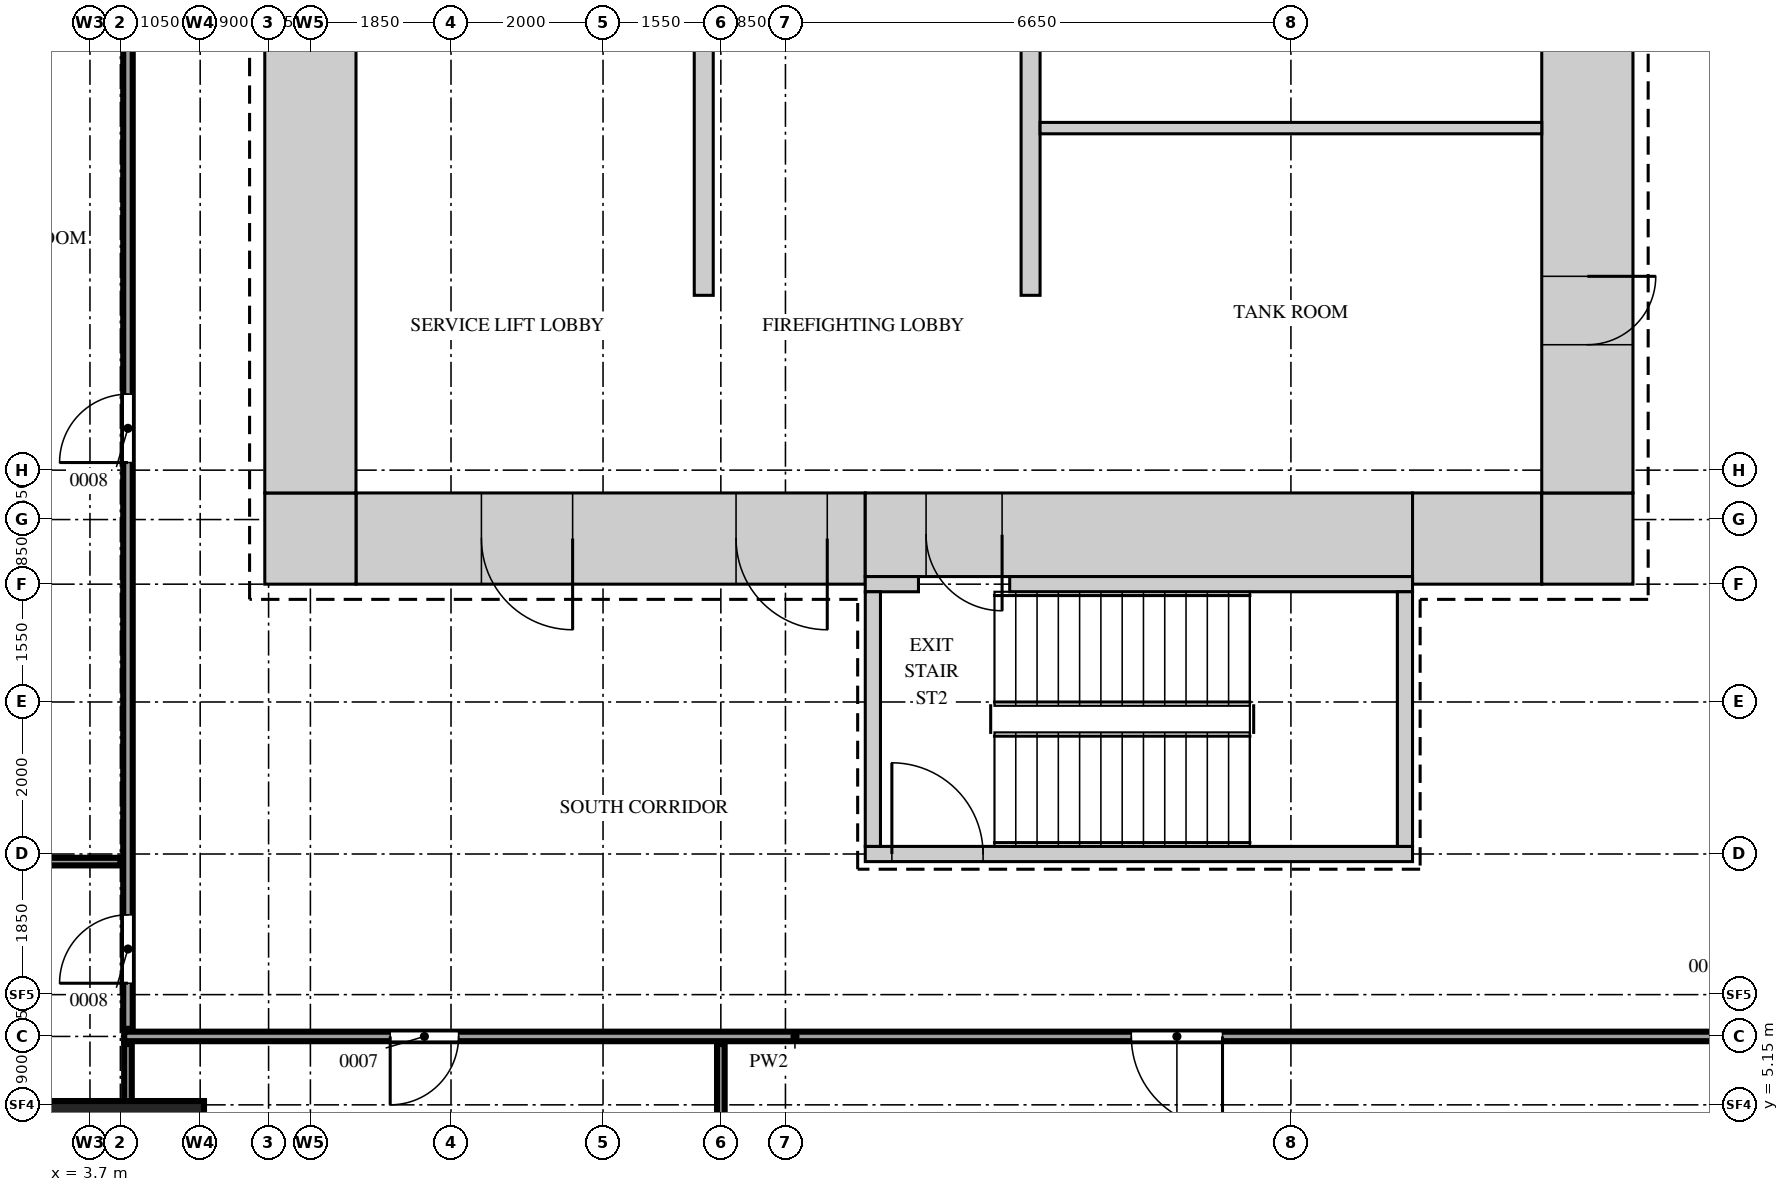
"""IFC4 building model, lengths in metres.
Left out: names, types, materials, properties, quantities, classifications, styles, units other than length and angle.
Written with IfcOpenShell. Run it as: python <this file> out.ifc"""

import sys

from ifc_helpers import new_model, si_unit, direction, frame, frame_2d, origin, origin_2d, place, context, subcontext, project, spatial, rectangle, extrude, source, transform, mapped, element, fill, save


model = new_model("IFC4")
c1 = context("Model", 3, precision=1e-05, world=origin(), true_north=direction((0.0, 1.0)))
c2 = subcontext(c1, "Body", "Model", "MODEL_VIEW")
j1 = project(units=[si_unit("LENGTHUNIT", "METRE"), si_unit("PLANEANGLEUNIT", "RADIAN")], contexts=[c1])
p1 = place(None, origin())
s1 = spatial("IfcSite", under=j1, at=p1, CompositionType="ELEMENT")
p2 = place(p1, origin())
s2 = spatial("IfcBuilding", under=s1, at=p2, CompositionType="ELEMENT")
p3 = place(p2, frame((0.0, 0.0, 37.5)))
s3 = spatial("IfcBuildingStorey", under=s2, at=p3, CompositionType="ELEMENT", Elevation=37.5)
m1 = source(origin(), c2, "Body", "SweptSolid", [
    extrude(rectangle(XDim=6.7, YDim=1.2, at=frame_2d((3.35, 0.0))), origin(), (0.0, 0.0, 1.0), 4.2),
])
p4 = place(p3, frame((7.2, 12.6, 0.0), z_axis=(0.0, 0.0, 1.0), x_axis=(1.0, 0.0, 0.0)))
e1 = element("IfcWall", 1, at=p4, inside=s3, PredefinedType="SHEAR", context=c2, shape_type="MappedRepresentation", body=[
    mapped(m1, transform((0.0, 0.0, 0.0))),
])
m2 = source(origin(), c2, "Body", "SweptSolid", [
    extrude(rectangle(XDim=1.2, YDim=2.1, at=frame_2d((0.6, 1.05))), frame((0.0, 0.61, 0.0), z_axis=(0.0, -1.0, 0.0), x_axis=(1.0, 0.0, 0.0)), (0.0, 0.0, 1.0), 1.22),
])
p5 = place(p4, frame((5.0, 0.0, 0.0)))
e2 = element("IfcOpeningElement", 2, at=p5, cuts=e1, PredefinedType="OPENING", context=c2, shape_type="MappedRepresentation", body=[
    mapped(m2, transform((0.0, 0.0, 0.0))),
])
p6 = place(p4, frame((1.65, 0.0, 0.0)))
e3 = element("IfcOpeningElement", 3, at=p6, cuts=e1, PredefinedType="OPENING", context=c2, shape_type="MappedRepresentation", body=[
    mapped(m2, transform((0.0, 0.0, 0.0))),
])
m3 = source(origin(), c2, "Body", "SweptSolid", [
    extrude(rectangle(XDim=7.2, YDim=1.1, at=frame_2d((3.6, 0.0))), origin(), (0.0, 0.0, 1.0), 4.2),
])
p7 = place(p3, frame((13.9, 12.65, 0.0), z_axis=(0.0, 0.0, 1.0), x_axis=(1.0, 0.0, 0.0)))
e4 = element("IfcWall", 4, at=p7, inside=s3, PredefinedType="SHEAR", context=c2, shape_type="MappedRepresentation", body=[
    mapped(m3, transform((0.0, 0.0, 0.0))),
])
m4 = source(origin(), c2, "Body", "SweptSolid", [
    extrude(rectangle(XDim=1.0, YDim=2.1, at=frame_2d((0.5, 1.05))), frame((0.0, 0.56, 0.0), z_axis=(0.0, -1.0, 0.0), x_axis=(1.0, 0.0, 0.0)), (0.0, 0.0, 1.0), 1.12),
])
p8 = place(p7, frame((0.8, 0.0, 0.0)))
e5 = element("IfcOpeningElement", 5, at=p8, cuts=e4, PredefinedType="OPENING", context=c2, shape_type="MappedRepresentation", body=[
    mapped(m4, transform((0.0, 0.0, 0.0))),
])
m5 = source(origin(), c2, "Body", "SweptSolid", [
    extrude(rectangle(XDim=1.7, YDim=1.2, at=frame_2d((0.85, 0.0))), origin(), (0.0, 0.0, 1.0), 4.2),
])
p9 = place(p3, frame((21.1, 12.6, 0.0), z_axis=(0.0, 0.0, 1.0), x_axis=(1.0, 0.0, 0.0)))
e6 = element("IfcWall", 6, at=p9, inside=s3, PredefinedType="SHEAR", context=c2, shape_type="MappedRepresentation", body=[
    mapped(m5, transform((0.0, 0.0, 0.0))),
])
m6 = source(origin(), c2, "Body", "SweptSolid", [
    extrude(rectangle(XDim=1.2, YDim=1.2, at=frame_2d((0.6, 0.0))), origin(), (0.0, 0.0, 1.0), 4.2),
])
for number, where, z_axis, x_axis in (
    (7, (22.8, 12.6, 0.0), (0.0, 0.0, 1.0), (1.0, 0.0, 0.0)),
    (8, (6.0, 12.6, 0.0), (0.0, 0.0, 1.0), (1.0, 0.0, 0.0)),
):
    element("IfcWall", number, at=place(p3, frame(where, z_axis=z_axis, x_axis=x_axis)), inside=s3, PredefinedType="SHEAR", context=c2, shape_type="MappedRepresentation", body=[
        mapped(m6, transform((0.0, 0.0, 0.0))),
    ])
m7 = source(origin(), c2, "Body", "SweptSolid", [
    extrude(rectangle(XDim=27.6, YDim=1.2, at=frame_2d((13.8, 0.0))), origin(), (0.0, 0.0, 1.0), 4.2),
])
p10 = place(p3, frame((23.4, 13.2, 0.0), z_axis=(0.0, 0.0, 1.0), x_axis=(0.0, 1.0, 0.0)))
e9 = element("IfcWall", 9, at=p10, inside=s3, PredefinedType="SHEAR", context=c2, shape_type="MappedRepresentation", body=[
    mapped(m7, transform((0.0, 0.0, 0.0))),
])
m8 = source(origin(), c2, "Body", "SweptSolid", [
    extrude(rectangle(XDim=1.8, YDim=2.1, at=frame_2d((0.9, 1.05))), frame((0.0, 0.61, 0.0), z_axis=(0.0, -1.0, 0.0), x_axis=(1.0, 0.0, 0.0)), (0.0, 0.0, 1.0), 1.22),
])
p11 = place(p10, frame((22.4, 0.0, 0.0)))
e10 = element("IfcOpeningElement", 10, at=p11, cuts=e9, PredefinedType="OPENING", context=c2, shape_type="MappedRepresentation", body=[
    mapped(m8, transform((0.0, 0.0, 0.0))),
])
p12 = place(p10, frame((13.65, 0.0, 0.0)))
e11 = element("IfcOpeningElement", 11, at=p12, cuts=e9, PredefinedType="OPENING", context=c2, shape_type="MappedRepresentation", body=[
    mapped(m2, transform((0.0, 0.0, 0.0))),
])
m9 = source(origin(), c2, "Body", "SweptSolid", [
    extrude(rectangle(XDim=0.9, YDim=2.1, at=frame_2d((0.45, 1.05))), frame((0.0, 0.61, 0.0), z_axis=(0.0, -1.0, 0.0), x_axis=(1.0, 0.0, 0.0)), (0.0, 0.0, 1.0), 1.22),
])
p13 = place(p10, frame((1.95, 0.0, 0.0)))
e12 = element("IfcOpeningElement", 12, at=p13, cuts=e9, PredefinedType="OPENING", context=c2, shape_type="MappedRepresentation", body=[
    mapped(m9, transform((0.0, 0.0, 0.0))),
])
p14 = place(p10, frame((6.8, 0.0, 0.0)))
e13 = element("IfcOpeningElement", 13, at=p14, cuts=e9, PredefinedType="OPENING", context=c2, shape_type="MappedRepresentation", body=[
    mapped(m9, transform((0.0, 0.0, 0.0))),
])
p15 = place(p3, frame((6.6, 13.2, 0.0), z_axis=(0.0, 0.0, 1.0), x_axis=(0.0, 1.0, 0.0)))
e14 = element("IfcWall", 14, at=p15, inside=s3, PredefinedType="SHEAR", context=c2, shape_type="MappedRepresentation", body=[
    mapped(m7, transform((0.0, 0.0, 0.0))),
])
m10 = source(origin(), c2, "Body", "SweptSolid", [
    extrude(rectangle(XDim=0.7, YDim=0.2, at=frame_2d((0.35, 0.0))), origin(), (0.0, 0.0, 1.0), 4.2),
])
p16 = place(p3, frame((13.9, 12.0, 0.0), z_axis=(0.0, 0.0, 1.0), x_axis=(1.0, 0.0, 0.0)))
e15 = element("IfcWall", 15, at=p16, inside=s3, PredefinedType="SHEAR", context=c2, shape_type="MappedRepresentation", body=[
    mapped(m10, transform((0.0, 0.0, 0.0))),
])
m11 = source(origin(), c2, "Body", "SweptSolid", [
    extrude(rectangle(XDim=5.3, YDim=0.2, at=frame_2d((2.65, 0.0))), origin(), (0.0, 0.0, 1.0), 4.2),
])
p17 = place(p3, frame((15.8, 12.0, 0.0), z_axis=(0.0, 0.0, 1.0), x_axis=(1.0, 0.0, 0.0)))
e16 = element("IfcWall", 16, at=p17, inside=s3, PredefinedType="SHEAR", context=c2, shape_type="MappedRepresentation", body=[
    mapped(m11, transform((0.0, 0.0, 0.0))),
])
m12 = source(origin(), c2, "Body", "SweptSolid", [
    extrude(rectangle(XDim=7.2, YDim=0.2, at=frame_2d((3.6, 0.0))), origin(), (0.0, 0.0, 1.0), 4.2),
])
p18 = place(p3, frame((13.9, 8.45, 0.0), z_axis=(0.0, 0.0, 1.0), x_axis=(1.0, 0.0, 0.0)))
e17 = element("IfcWall", 17, at=p18, inside=s3, PredefinedType="SHEAR", context=c2, shape_type="MappedRepresentation", body=[
    mapped(m12, transform((0.0, 0.0, 0.0))),
])
m13 = source(origin(), c2, "Body", "SweptSolid", [
    extrude(rectangle(XDim=1.2, YDim=2.1, at=frame_2d((0.6, 1.05))), frame((0.0, 0.11, 0.0), z_axis=(0.0, -1.0, 0.0), x_axis=(1.0, 0.0, 0.0)), (0.0, 0.0, 1.0), 0.22),
])
p19 = place(p18, frame((0.35, 0.0, 0.0)))
e18 = element("IfcOpeningElement", 18, at=p19, cuts=e17, PredefinedType="OPENING", context=c2, shape_type="MappedRepresentation", body=[
    mapped(m13, transform((0.0, 0.0, 0.0))),
])
m14 = source(origin(), c2, "Body", "SweptSolid", [
    extrude(rectangle(XDim=3.35, YDim=0.2, at=frame_2d((1.675, 0.0))), origin(), (0.0, 0.0, 1.0), 4.2),
])
for number, where, z_axis, x_axis in (
    (19, (21.0, 8.55, 0.0), (0.0, 0.0, 1.0), (0.0, 1.0, 0.0)),
    (20, (14.0, 8.55, 0.0), (0.0, 0.0, 1.0), (0.0, 1.0, 0.0)),
):
    element("IfcWall", number, at=place(p3, frame(where, z_axis=z_axis, x_axis=x_axis)), inside=s3, PredefinedType="SHEAR", context=c2, shape_type="MappedRepresentation", body=[
        mapped(m14, transform((0.0, 0.0, 0.0))),
    ])
m15 = source(origin(), c2, "Body", "SweptSolid", [
    extrude(rectangle(XDim=3.4, YDim=0.25, at=frame_2d((1.7, 0.0))), origin(), (0.0, 0.0, 1.0), 4.2),
])
for number, where, z_axis, x_axis in (
    (21, (16.075, 15.8, 0.0), (0.0, 0.0, 1.0), (0.0, 1.0, 0.0)),
    (22, (11.775, 15.8, 0.0), (0.0, 0.0, 1.0), (0.0, 1.0, 0.0)),
):
    element("IfcWall", number, at=place(p3, frame(where, z_axis=z_axis, x_axis=x_axis)), inside=s3, PredefinedType="STANDARD", context=c2, shape_type="MappedRepresentation", body=[
        mapped(m15, transform((0.0, 0.0, 0.0))),
    ])
m16 = source(origin(), c2, "Body", "SweptSolid", [
    extrude(rectangle(XDim=2.2, YDim=2.2, at=origin_2d()), origin(), (0.0, 0.0, 1.0), 4.5),
])
p20 = place(p3, frame((4.1, 4.1, 0.0), z_axis=(0.0, 0.0, 1.0), x_axis=(1.0, 0.0, 0.0)))
e23 = element("IfcColumn", 23, at=p20, inside=s3, PredefinedType="COLUMN", context=c2, shape_type="MappedRepresentation", body=[
    mapped(m16, transform((0.0, 0.0, 0.0))),
])
m17 = source(origin(), c2, "Body", "SweptSolid", [
    extrude(rectangle(XDim=5.8, YDim=0.1, at=frame_2d((2.9, 0.0))), origin(), (0.0, 0.0, 1.0), 3.6),
])
p21 = place(p3, frame((4.2, 0.15, 0.0), z_axis=(0.0, 0.0, 1.0), x_axis=(0.0, 1.0, 0.0)))
e24 = element("IfcWall", 24, at=p21, inside=s3, PredefinedType="PARTITIONING", context=c2, shape_type="MappedRepresentation", body=[
    mapped(m17, transform((0.0, 0.0, 0.0))),
])
m18 = source(origin(), c2, "Body", "SweptSolid", [
    extrude(rectangle(XDim=5.8, YDim=0.1, at=frame_2d((2.9, 0.0))), origin(), (0.0, 0.0, 1.0), 3.7),
])
p22 = place(p3, frame((12.0, 0.15, 0.0), z_axis=(0.0, 0.0, 1.0), x_axis=(0.0, 1.0, 0.0)))
e25 = element("IfcWall", 25, at=p22, inside=s3, PredefinedType="PARTITIONING", context=c2, shape_type="MappedRepresentation", body=[
    mapped(m18, transform((0.0, 0.0, 0.0))),
])
m19 = source(origin(), c2, "Body", "SweptSolid", [
    extrude(rectangle(XDim=22.15, YDim=0.125, at=frame_2d((11.075, 0.0))), origin(), (0.0, 0.0, 1.0), 4.3),
])
p23 = place(p3, frame((4.15, 6.05, 0.0), z_axis=(0.0, 0.0, 1.0), x_axis=(1.0, 0.0, 0.0)))
e26 = element("IfcWall", 26, at=p23, inside=s3, PredefinedType="PARTITIONING", context=c2, shape_type="MappedRepresentation", body=[
    mapped(m19, transform((0.0, 0.0, 0.0))),
])
m20 = source(origin(), c2, "Body", "SweptSolid", [
    extrude(rectangle(XDim=0.9, YDim=2.1, at=frame_2d((0.45, 1.05))), frame((0.0, 0.073, 0.0), z_axis=(0.0, -1.0, 0.0), x_axis=(1.0, 0.0, 0.0)), (0.0, 0.0, 1.0), 0.145),
])
p24 = place(p23, frame((3.5, 0.0, 0.0)))
e27 = element("IfcOpeningElement", 27, at=p24, cuts=e26, PredefinedType="OPENING", context=c2, shape_type="MappedRepresentation", body=[
    mapped(m20, transform((0.0, 0.0, 0.0))),
])
m21 = source(origin(), c2, "Body", "SweptSolid", [
    extrude(rectangle(XDim=1.2, YDim=2.1, at=frame_2d((0.6, 1.05))), frame((0.0, 0.073, 0.0), z_axis=(0.0, -1.0, 0.0), x_axis=(1.0, 0.0, 0.0)), (0.0, 0.0, 1.0), 0.145),
])
p25 = place(p23, frame((13.25, 0.0, 0.0)))
e28 = element("IfcOpeningElement", 28, at=p25, cuts=e26, PredefinedType="OPENING", context=c2, shape_type="MappedRepresentation", body=[
    mapped(m21, transform((0.0, 0.0, 0.0))),
])
m22 = source(origin(), c2, "Body", "SweptSolid", [
    extrude(rectangle(XDim=27.75, YDim=0.125, at=frame_2d((13.875, 0.0))), origin(), (0.0, 0.0, 1.0), 4.3),
])
p26 = place(p3, frame((4.2, 6.15, 0.0), z_axis=(0.0, 0.0, 1.0), x_axis=(0.0, 1.0, 0.0)))
e29 = element("IfcWall", 29, at=p26, inside=s3, PredefinedType="PARTITIONING", context=c2, shape_type="MappedRepresentation", body=[
    mapped(m22, transform((0.0, 0.0, 0.0))),
])
p27 = place(p26, frame((0.6, 0.0, 0.0)))
e30 = element("IfcOpeningElement", 30, at=p27, cuts=e29, PredefinedType="OPENING", context=c2, shape_type="MappedRepresentation", body=[
    mapped(m20, transform((0.0, 0.0, 0.0))),
])
p28 = place(p26, frame((7.45, 0.0, 0.0)))
e31 = element("IfcOpeningElement", 31, at=p28, cuts=e29, PredefinedType="OPENING", context=c2, shape_type="MappedRepresentation", body=[
    mapped(m20, transform((0.0, 0.0, 0.0))),
])
p29 = place(p26, frame((20.55, 0.0, 0.0)))
e32 = element("IfcOpeningElement", 32, at=p29, cuts=e29, PredefinedType="OPENING", context=c2, shape_type="MappedRepresentation", body=[
    mapped(m20, transform((0.0, 0.0, 0.0))),
])
m23 = source(origin(), c2, "Body", "SweptSolid", [
    extrude(rectangle(XDim=3.95, YDim=0.1, at=frame_2d((1.975, 0.0))), origin(), (0.0, 0.0, 1.0), 4.3),
])
p30 = place(p3, frame((0.15, 8.35, 0.0), z_axis=(0.0, 0.0, 1.0), x_axis=(1.0, 0.0, 0.0)))
e33 = element("IfcWall", 33, at=p30, inside=s3, PredefinedType="PARTITIONING", context=c2, shape_type="MappedRepresentation", body=[
    mapped(m23, transform((0.0, 0.0, 0.0))),
])
m24 = source(origin(), c2, "Body", "SweptSolid", [
    extrude(rectangle(XDim=6.6, YDim=0.15, at=frame_2d((3.3, 0.0))), origin(), (0.0, 0.0, 1.0), 4.3),
])
p31 = place(p3, frame((16.2, 18.0, 0.0), z_axis=(0.0, 0.0, 1.0), x_axis=(1.0, 0.0, 0.0)))
e34 = element("IfcWall", 34, at=p31, inside=s3, PredefinedType="PARTITIONING", context=c2, shape_type="MappedRepresentation", body=[
    mapped(m24, transform((0.0, 0.0, 0.0))),
])
m25 = source(origin(), c2, "Body", "SweptSolid", [
    extrude(rectangle(XDim=0.9, YDim=2.1, at=frame_2d((0.45, 1.05))), frame((0.0, 0.55, 0.0), z_axis=(0.0, -1.0, 0.0), x_axis=(1.0, 0.0, 0.0)), (0.0, 0.0, 1.0), 1.1),
])
p32 = place(p13, origin())
e35 = element("IfcDoor", 35, at=p32, inside=s3, OperationType="SINGLE_SWING_RIGHT", PredefinedType="DOOR", context=c2, shape_type="MappedRepresentation", body=[
    mapped(m25, transform((0.0, 0.0, 0.0))),
])
fill(e12, e35)
m26 = source(origin(), c2, "Body", "SweptSolid", [
    extrude(rectangle(XDim=1.2, YDim=2.1, at=frame_2d((0.6, 1.05))), frame((0.0, 0.55, 0.0), z_axis=(0.0, -1.0, 0.0), x_axis=(1.0, 0.0, 0.0)), (0.0, 0.0, 1.0), 1.1),
])
p33 = place(p5, origin())
e36 = element("IfcDoor", 36, at=p33, inside=s3, OperationType="SINGLE_SWING_RIGHT", PredefinedType="DOOR", context=c2, shape_type="MappedRepresentation", body=[
    mapped(m26, transform((0.0, 0.0, 0.0))),
])
fill(e2, e36)
p34 = place(p6, origin())
e37 = element("IfcDoor", 37, at=p34, inside=s3, OperationType="SINGLE_SWING_RIGHT", PredefinedType="DOOR", context=c2, shape_type="MappedRepresentation", body=[
    mapped(m26, transform((0.0, 0.0, 0.0))),
])
fill(e3, e37)
m27 = source(origin(), c2, "Body", "SweptSolid", [
    extrude(rectangle(XDim=1.0, YDim=2.1, at=frame_2d((0.5, 1.05))), frame((0.0, 0.5, 0.0), z_axis=(0.0, -1.0, 0.0), x_axis=(1.0, 0.0, 0.0)), (0.0, 0.0, 1.0), 1.0),
])
p35 = place(p8, origin())
e38 = element("IfcDoor", 38, at=p35, inside=s3, OperationType="SINGLE_SWING_RIGHT", PredefinedType="DOOR", context=c2, shape_type="MappedRepresentation", body=[
    mapped(m27, transform((0.0, 0.0, 0.0))),
])
fill(e5, e38)
m28 = source(origin(), c2, "Body", "SweptSolid", [
    extrude(rectangle(XDim=0.9, YDim=2.1, at=frame_2d((0.45, 1.05))), frame((0.0, 0.025, 0.0), z_axis=(0.0, -1.0, 0.0), x_axis=(1.0, 0.0, 0.0)), (0.0, 0.0, 1.0), 0.05),
])
p36 = place(p27, origin())
e39 = element("IfcDoor", 39, at=p36, inside=s3, OperationType="SINGLE_SWING_RIGHT", PredefinedType="DOOR", context=c2, shape_type="MappedRepresentation", body=[
    mapped(m28, transform((0.0, 0.0, 0.0))),
])
fill(e30, e39)
p37 = place(p28, origin())
e40 = element("IfcDoor", 40, at=p37, inside=s3, OperationType="SINGLE_SWING_RIGHT", PredefinedType="DOOR", context=c2, shape_type="MappedRepresentation", body=[
    mapped(m28, transform((0.0, 0.0, 0.0))),
])
fill(e31, e40)
p38 = place(p24, origin())
e41 = element("IfcDoor", 41, at=p38, inside=s3, OperationType="SINGLE_SWING_LEFT", PredefinedType="DOOR", context=c2, shape_type="MappedRepresentation", body=[
    mapped(m28, transform((0.0, 0.0, 0.0))),
])
fill(e27, e41)
m29 = source(origin(), c2, "Body", "SweptSolid", [
    extrude(rectangle(XDim=1.2, YDim=2.1, at=frame_2d((0.6, 1.05))), frame((0.0, 0.025, 0.0), z_axis=(0.0, -1.0, 0.0), x_axis=(1.0, 0.0, 0.0)), (0.0, 0.0, 1.0), 0.05),
])
p39 = place(p25, origin())
e42 = element("IfcDoor", 42, at=p39, inside=s3, OperationType="SINGLE_SWING_RIGHT", PredefinedType="DOOR", context=c2, shape_type="MappedRepresentation", body=[
    mapped(m29, transform((0.0, 0.0, 0.0))),
])
fill(e28, e42)
p40 = place(p19, origin())
e43 = element("IfcDoor", 43, at=p40, inside=s3, OperationType="SINGLE_SWING_RIGHT", PredefinedType="DOOR", context=c2, shape_type="MappedRepresentation", body=[
    mapped(m29, transform((0.0, 0.0, 0.0))),
])
fill(e18, e43)
save(model, sys.argv[1])
